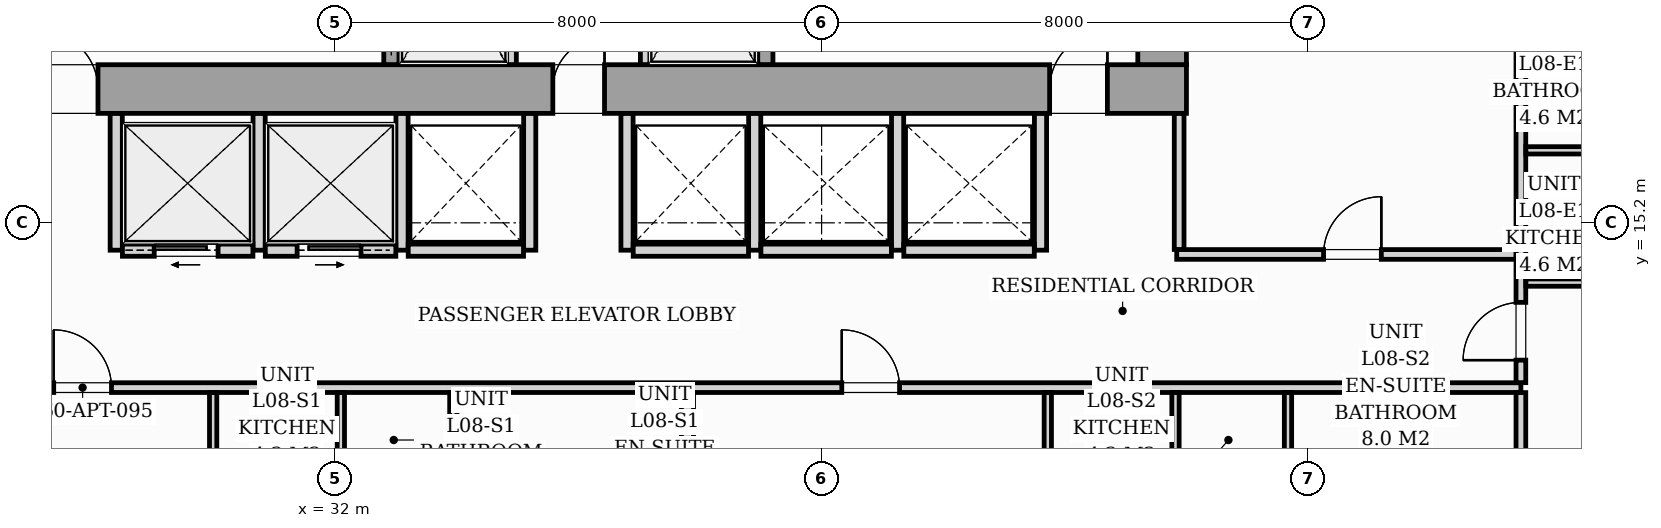
"""IFC4 building model, lengths in metres.
Left out: names, types, materials, properties, quantities, classifications, styles, units other than length and angle.
Written with IfcOpenShell. Run it as: python <this file> out.ifc"""

import sys

from ifc_helpers import new_model, si_unit, direction, frame, frame_2d, origin, origin_2d, place, context, subcontext, project, spatial, rectangle, i_section, extrude, source, transform, mapped, element, fill, save


model = new_model("IFC4")
c1 = context("Model", 3, precision=1e-05, world=origin(), true_north=direction((0.0, 1.0)))
c2 = subcontext(c1, "Body", "Model", "MODEL_VIEW")
j1 = project(units=[si_unit("LENGTHUNIT", "METRE"), si_unit("PLANEANGLEUNIT", "RADIAN")], contexts=[c1])
p1 = place(None, origin())
s1 = spatial("IfcSite", under=j1, at=p1, CompositionType="ELEMENT")
p2 = place(p1, origin())
s2 = spatial("IfcBuilding", under=s1, at=p2, CompositionType="ELEMENT")
p3 = place(p2, frame((0.0, 0.0, 32.6)))
s3 = spatial("IfcBuildingStorey", under=s2, at=p3, CompositionType="ELEMENT", Elevation=32.6)
m1 = source(origin(), c2, "Body", "SweptSolid", [
    extrude(i_section(OverallWidth=0.437, OverallDepth=0.514, WebThickness=0.061, FlangeThickness=0.097, FilletRadius=0.018, at=origin_2d()), origin(), (0.0, 0.0, 1.0), 3.196),
])
for number, where, z_axis, x_axis in (
    (1, (33.12, 17.4, 0.002), (0.0, 0.0, 1.0), (1.0, 0.0, 0.0)),
    (2, (38.88, 17.4, 0.002), (0.0, 0.0, 1.0), (1.0, 0.0, 0.0)),
    (3, (45.6, 17.4, 0.002), (0.0, 0.0, 1.0), (1.0, 0.0, 0.0)),
):
    element("IfcColumn", number, at=place(p3, frame(where, z_axis=z_axis, x_axis=x_axis)), inside=s3, PredefinedType="PILASTER", context=c2, shape_type="MappedRepresentation", body=[
        mapped(m1, transform((0.0, 0.0, 0.0), scale=1.0)),
    ])
p4 = place(p3, frame((26.0, 17.4, 0.0), z_axis=(0.0, 0.0, 1.0), x_axis=(1.0, 0.0, 0.0)))
e4 = element("IfcWall", 4, at=p4, inside=s3, PredefinedType="SHEAR", context=c2, shape_type="SweptSolid", body=[
    extrude(rectangle(XDim=20.0, YDim=0.8, at=frame_2d((10.0, 0.0))), origin(), (0.0, 0.0, 1.0), 3.2),
])
p5 = place(p4, frame((1.15, 0.0, 0.0)))
e5 = element("IfcOpeningElement", 5, at=p5, cuts=e4, PredefinedType="OPENING", context=c2, shape_type="SweptSolid", body=[
    extrude(rectangle(XDim=0.95, YDim=2.06, at=frame_2d((0.475, 1.03))), frame((0.0, 0.41, 0.0), z_axis=(0.0, -1.0, 0.0), x_axis=(1.0, 0.0, 0.0)), (0.0, 0.0, 1.0), 0.82),
])
p6 = place(p4, frame((9.58, 0.0, 0.0)))
e6 = element("IfcOpeningElement", 6, at=p6, cuts=e4, PredefinedType="OPENING", context=c2, shape_type="SweptSolid", body=[
    extrude(rectangle(XDim=0.85, YDim=2.0, at=frame_2d((0.425, 1.0))), frame((0.0, 0.41, 0.0), z_axis=(0.0, -1.0, 0.0), x_axis=(1.0, 0.0, 0.0)), (0.0, 0.0, 1.0), 0.82),
])
p7 = place(p4, frame((17.75, 0.0, 0.0)))
e7 = element("IfcOpeningElement", 7, at=p7, cuts=e4, PredefinedType="OPENING", context=c2, shape_type="SweptSolid", body=[
    extrude(rectangle(XDim=0.95, YDim=2.06, at=frame_2d((0.475, 1.03))), frame((0.0, 0.41, 0.0), z_axis=(0.0, -1.0, 0.0), x_axis=(1.0, 0.0, 0.0)), (0.0, 0.0, 1.0), 0.82),
])
p8 = place(p3, frame((45.6, 17.802, 0.0), z_axis=(0.0, 0.0, 1.0), x_axis=(0.0, 1.0, 0.0)))
e8 = element("IfcWall", 8, at=p8, inside=s3, PredefinedType="SHEAR", context=c2, shape_type="SweptSolid", body=[
    extrude(rectangle(XDim=5.796, YDim=0.8, at=frame_2d((2.898, 0.0))), origin(), (0.0, 0.0, 1.0), 3.2),
])
p9 = place(p3, frame((32.925, 17.802, 0.0), z_axis=(0.0, 0.0, 1.0), x_axis=(0.0, 1.0, 0.0)))
e9 = element("IfcWall", 9, at=p9, inside=s3, PredefinedType="SOLIDWALL", context=c2, shape_type="SweptSolid", body=[
    extrude(rectangle(XDim=2.646, YDim=0.25, at=frame_2d((1.323, 0.0))), origin(), (0.0, 0.0, 1.0), 3.2),
])
p10 = place(p9, frame((0.648, 0.0, 0.0)))
e10 = element("IfcOpeningElement", 10, at=p10, cuts=e9, PredefinedType="OPENING", context=c2, shape_type="SweptSolid", body=[
    extrude(rectangle(XDim=1.1, YDim=2.08, at=frame_2d((0.55, 1.04))), frame((0.0, 0.135, 0.0), z_axis=(0.0, -1.0, 0.0), x_axis=(1.0, 0.0, 0.0)), (0.0, 0.0, 1.0), 0.27),
])
for number, where, z_axis, x_axis in (
    (11, (34.9, 17.802, 0.0), (0.0, 0.0, 1.0), (0.0, 1.0, 0.0)),
    (12, (37.1, 17.802, 0.0), (0.0, 0.0, 1.0), (0.0, 1.0, 0.0)),
):
    element("IfcWall", number, at=place(p3, frame(where, z_axis=z_axis, x_axis=x_axis)), inside=s3, PredefinedType="PARTITIONING", context=c2, shape_type="SweptSolid", body=[
        extrude(rectangle(XDim=2.646, YDim=0.16, at=frame_2d((1.323, 0.0))), origin(), (0.0, 0.0, 1.0), 2.94),
    ])
p11 = place(p3, frame((39.075, 17.802, 0.0), z_axis=(0.0, 0.0, 1.0), x_axis=(0.0, 1.0, 0.0)))
e13 = element("IfcWall", 13, at=p11, inside=s3, PredefinedType="SOLIDWALL", context=c2, shape_type="SweptSolid", body=[
    extrude(rectangle(XDim=2.646, YDim=0.25, at=frame_2d((1.323, 0.0))), origin(), (0.0, 0.0, 1.0), 3.2),
])
p12 = place(p11, frame((0.648, 0.0, 0.0)))
e14 = element("IfcOpeningElement", 14, at=p12, cuts=e13, PredefinedType="OPENING", context=c2, shape_type="SweptSolid", body=[
    extrude(rectangle(XDim=1.1, YDim=2.08, at=frame_2d((0.55, 1.04))), frame((0.0, 0.135, 0.0), z_axis=(0.0, -1.0, 0.0), x_axis=(1.0, 0.0, 0.0)), (0.0, 0.0, 1.0), 0.27),
])
for number, where, z_axis, x_axis in (
    (15, (28.4, 14.75, 0.0), (0.0, 0.0, 1.0), (0.0, 1.0, 0.0)),
    (16, (30.75, 14.75, 0.0), (0.0, 0.0, 1.0), (0.0, 1.0, 0.0)),
    (17, (33.1, 14.75, 0.0), (0.0, 0.0, 1.0), (0.0, 1.0, 0.0)),
):
    element("IfcWall", number, at=place(p3, frame(where, z_axis=z_axis, x_axis=x_axis)), inside=s3, PredefinedType="PARTITIONING", context=c2, shape_type="SweptSolid", body=[
        extrude(rectangle(XDim=2.248, YDim=0.2, at=frame_2d((1.124, 0.0))), origin(), (0.0, 0.0, 1.0), 2.94),
    ])
p13 = place(p3, frame((28.502, 14.75, 0.0), z_axis=(0.0, 0.0, 1.0), x_axis=(1.0, 0.0, 0.0)))
e18 = element("IfcWall", 18, at=p13, inside=s3, PredefinedType="PARTITIONING", context=c2, shape_type="SweptSolid", body=[
    extrude(rectangle(XDim=2.146, YDim=0.2, at=frame_2d((1.073, 0.0))), origin(), (0.0, 0.0, 1.0), 2.94),
])
p14 = place(p13, frame((0.523, 0.0, 0.0)))
e19 = element("IfcOpeningElement", 19, at=p14, cuts=e18, PredefinedType="OPENING", context=c2, shape_type="SweptSolid", body=[
    extrude(rectangle(XDim=1.05, YDim=2.08, at=frame_2d((0.525, 1.04))), frame((0.0, 0.11, 0.0), z_axis=(0.0, -1.0, 0.0), x_axis=(1.0, 0.0, 0.0)), (0.0, 0.0, 1.0), 0.22),
])
p15 = place(p3, frame((30.852, 14.75, 0.0), z_axis=(0.0, 0.0, 1.0), x_axis=(1.0, 0.0, 0.0)))
e20 = element("IfcWall", 20, at=p15, inside=s3, PredefinedType="PARTITIONING", context=c2, shape_type="SweptSolid", body=[
    extrude(rectangle(XDim=2.146, YDim=0.2, at=frame_2d((1.073, 0.0))), origin(), (0.0, 0.0, 1.0), 2.94),
])
p16 = place(p15, frame((0.523, 0.0, 0.0)))
e21 = element("IfcOpeningElement", 21, at=p16, cuts=e20, PredefinedType="OPENING", context=c2, shape_type="SweptSolid", body=[
    extrude(rectangle(XDim=1.05, YDim=2.08, at=frame_2d((0.525, 1.04))), frame((0.0, 0.11, 0.0), z_axis=(0.0, -1.0, 0.0), x_axis=(1.0, 0.0, 0.0)), (0.0, 0.0, 1.0), 0.22),
])
p17 = place(p3, frame((35.2, 14.75, 0.0), z_axis=(0.0, 0.0, 1.0), x_axis=(0.0, 1.0, 0.0)))
e22 = element("IfcWall", 22, at=p17, inside=s3, PredefinedType="PARTITIONING", context=c2, shape_type="SweptSolid", body=[
    extrude(rectangle(XDim=2.248, YDim=0.2, at=frame_2d((1.124, 0.0))), origin(), (0.0, 0.0, 1.0), 2.94),
])
p18 = place(p3, frame((33.202, 14.75, 0.0), z_axis=(0.0, 0.0, 1.0), x_axis=(1.0, 0.0, 0.0)))
e23 = element("IfcWall", 23, at=p18, inside=s3, PredefinedType="PARTITIONING", context=c2, shape_type="SweptSolid", body=[
    extrude(rectangle(XDim=1.896, YDim=0.2, at=frame_2d((0.948, 0.0))), origin(), (0.0, 0.0, 1.0), 2.94),
])
for number, where, z_axis, x_axis in (
    (24, (36.8, 14.75, 0.0), (0.0, 0.0, 1.0), (0.0, 1.0, 0.0)),
    (25, (38.9, 14.75, 0.0), (0.0, 0.0, 1.0), (0.0, 1.0, 0.0)),
):
    element("IfcWall", number, at=place(p3, frame(where, z_axis=z_axis, x_axis=x_axis)), inside=s3, PredefinedType="PARTITIONING", context=c2, shape_type="SweptSolid", body=[
        extrude(rectangle(XDim=2.248, YDim=0.2, at=frame_2d((1.124, 0.0))), origin(), (0.0, 0.0, 1.0), 2.94),
    ])
p19 = place(p3, frame((36.902, 14.75, 0.0), z_axis=(0.0, 0.0, 1.0), x_axis=(1.0, 0.0, 0.0)))
e26 = element("IfcWall", 26, at=p19, inside=s3, PredefinedType="PARTITIONING", context=c2, shape_type="SweptSolid", body=[
    extrude(rectangle(XDim=1.896, YDim=0.2, at=frame_2d((0.948, 0.0))), origin(), (0.0, 0.0, 1.0), 2.94),
])
for number, where, z_axis, x_axis in (
    (27, (41.25, 14.75, 0.0), (0.0, 0.0, 1.0), (0.0, 1.0, 0.0)),
    (28, (43.6, 14.75, 0.0), (0.0, 0.0, 1.0), (0.0, 1.0, 0.0)),
):
    element("IfcWall", number, at=place(p3, frame(where, z_axis=z_axis, x_axis=x_axis)), inside=s3, PredefinedType="PARTITIONING", context=c2, shape_type="SweptSolid", body=[
        extrude(rectangle(XDim=2.248, YDim=0.2, at=frame_2d((1.124, 0.0))), origin(), (0.0, 0.0, 1.0), 2.94),
    ])
for number, where, z_axis, x_axis in (
    (29, (39.002, 14.75, 0.0), (0.0, 0.0, 1.0), (1.0, 0.0, 0.0)),
    (30, (41.352, 14.75, 0.0), (0.0, 0.0, 1.0), (1.0, 0.0, 0.0)),
):
    element("IfcWall", number, at=place(p3, frame(where, z_axis=z_axis, x_axis=x_axis)), inside=s3, PredefinedType="PARTITIONING", context=c2, shape_type="SweptSolid", body=[
        extrude(rectangle(XDim=2.146, YDim=0.2, at=frame_2d((1.073, 0.0))), origin(), (0.0, 0.0, 1.0), 2.94),
    ])
p20 = place(p3, frame((16.3, 12.49, 0.0), z_axis=(0.0, 0.0, 1.0), x_axis=(1.0, 0.0, 0.0)))
e31 = element("IfcWall", 31, at=p20, inside=s3, PredefinedType="PARTITIONING", context=c2, shape_type="SweptSolid", body=[
    extrude(rectangle(XDim=35.2, YDim=0.16, at=frame_2d((17.6, 0.0))), origin(), (0.0, 0.0, 1.0), 2.94),
])
p21 = place(p20, frame((11.072, 0.0, 0.0)))
e32 = element("IfcOpeningElement", 32, at=p21, cuts=e31, PredefinedType="OPENING", context=c2, shape_type="SweptSolid", body=[
    extrude(rectangle(XDim=0.95, YDim=2.06, at=frame_2d((0.475, 1.03))), frame((0.0, 0.09, 0.0), z_axis=(0.0, -1.0, 0.0), x_axis=(1.0, 0.0, 0.0)), (0.0, 0.0, 1.0), 0.18),
])
p22 = place(p20, frame((24.032, 0.0, 0.0)))
e33 = element("IfcOpeningElement", 33, at=p22, cuts=e31, PredefinedType="OPENING", context=c2, shape_type="SweptSolid", body=[
    extrude(rectangle(XDim=0.95, YDim=2.06, at=frame_2d((0.475, 1.03))), frame((0.0, 0.09, 0.0), z_axis=(0.0, -1.0, 0.0), x_axis=(1.0, 0.0, 0.0)), (0.0, 0.0, 1.0), 0.18),
])
p23 = place(p3, frame((51.5, 2.962, 0.0), z_axis=(0.0, 0.0, 1.0), x_axis=(0.0, 1.0, 0.0)))
e34 = element("IfcWall", 34, at=p23, inside=s3, PredefinedType="PARTITIONING", context=c2, shape_type="SweptSolid", body=[
    extrude(rectangle(XDim=9.446, YDim=0.16, at=frame_2d((4.723, 0.0))), origin(), (0.0, 0.0, 1.0), 2.94),
])
p24 = place(p3, frame((51.5, 12.572, 0.0), z_axis=(0.0, 0.0, 1.0), x_axis=(0.0, 1.0, 0.0)))
e35 = element("IfcWall", 35, at=p24, inside=s3, PredefinedType="PARTITIONING", context=c2, shape_type="SweptSolid", body=[
    extrude(rectangle(XDim=14.866, YDim=0.16, at=frame_2d((7.433, 0.0))), origin(), (0.0, 0.0, 1.0), 2.94),
])
p25 = place(p24, frame((0.37, 0.0, 0.0)))
e36 = element("IfcOpeningElement", 36, at=p25, cuts=e35, PredefinedType="OPENING", context=c2, shape_type="SweptSolid", body=[
    extrude(rectangle(XDim=0.95, YDim=2.06, at=frame_2d((0.475, 1.03))), frame((0.0, 0.09, 0.0), z_axis=(0.0, -1.0, 0.0), x_axis=(1.0, 0.0, 0.0)), (0.0, 0.0, 1.0), 0.18),
])
p26 = place(p3, frame((33.944, 2.78, 0.0), z_axis=(0.0, 0.0, 1.0), x_axis=(0.0, 1.0, 0.0)))
e37 = element("IfcWall", 37, at=p26, inside=s3, PredefinedType="PARTITIONING", context=c2, shape_type="SweptSolid", body=[
    extrude(rectangle(XDim=9.628, YDim=0.12, at=frame_2d((4.814, 0.0))), origin(), (0.0, 0.0, 1.0), 2.94),
])
p27 = place(p26, frame((6.36, 0.0, 0.0)))
e38 = element("IfcOpeningElement", 38, at=p27, cuts=e37, PredefinedType="OPENING", context=c2, shape_type="SweptSolid", body=[
    extrude(rectangle(XDim=0.9, YDim=2.05, at=frame_2d((0.45, 1.025))), frame((0.0, 0.07, 0.0), z_axis=(0.0, -1.0, 0.0), x_axis=(1.0, 0.0, 0.0)), (0.0, 0.0, 1.0), 0.14),
])
for number, where, z_axis, x_axis in (
    (39, (32.094, 10.302, 0.0), (0.0, 0.0, 1.0), (0.0, 1.0, 0.0)),
    (40, (29.994, 10.302, 0.0), (0.0, 0.0, 1.0), (0.0, 1.0, 0.0)),
):
    element("IfcWall", number, at=place(p3, frame(where, z_axis=z_axis, x_axis=x_axis)), inside=s3, PredefinedType="PARTITIONING", context=c2, shape_type="SweptSolid", body=[
        extrude(rectangle(XDim=2.106, YDim=0.12, at=frame_2d((1.053, 0.0))), origin(), (0.0, 0.0, 1.0), 2.94),
    ])
p28 = place(p3, frame((37.794, 10.252, 0.0), z_axis=(0.0, 0.0, 1.0), x_axis=(0.0, 1.0, 0.0)))
e41 = element("IfcWall", 41, at=p28, inside=s3, PredefinedType="PARTITIONING", context=c2, shape_type="SweptSolid", body=[
    extrude(rectangle(XDim=2.156, YDim=0.2, at=frame_2d((1.078, 0.0))), origin(), (0.0, 0.0, 1.0), 2.94),
])
p29 = place(p3, frame((47.67, 2.962, 0.0), z_axis=(0.0, 0.0, 1.0), x_axis=(0.0, 1.0, 0.0)))
e42 = element("IfcWall", 42, at=p29, inside=s3, PredefinedType="PARTITIONING", context=c2, shape_type="SweptSolid", body=[
    extrude(rectangle(XDim=9.446, YDim=0.12, at=frame_2d((4.723, 0.0))), origin(), (0.0, 0.0, 1.0), 2.94),
])
p30 = place(p29, frame((6.178, 0.0, 0.0)))
e43 = element("IfcOpeningElement", 43, at=p30, cuts=e42, PredefinedType="OPENING", context=c2, shape_type="SweptSolid", body=[
    extrude(rectangle(XDim=0.9, YDim=2.05, at=frame_2d((0.45, 1.025))), frame((0.0, 0.07, 0.0), z_axis=(0.0, -1.0, 0.0), x_axis=(1.0, 0.0, 0.0)), (0.0, 0.0, 1.0), 0.14),
])
for number, where, z_axis, x_axis in (
    (44, (45.82, 10.302, 0.0), (0.0, 0.0, 1.0), (0.0, 1.0, 0.0)),
    (45, (43.72, 10.302, 0.0), (0.0, 0.0, 1.0), (0.0, 1.0, 0.0)),
):
    element("IfcWall", number, at=place(p3, frame(where, z_axis=z_axis, x_axis=x_axis)), inside=s3, PredefinedType="PARTITIONING", context=c2, shape_type="SweptSolid", body=[
        extrude(rectangle(XDim=2.106, YDim=0.12, at=frame_2d((1.053, 0.0))), origin(), (0.0, 0.0, 1.0), 2.94),
    ])
p31 = place(p3, frame((51.582, 16.392, 0.0), z_axis=(0.0, 0.0, 1.0), x_axis=(1.0, 0.0, 0.0)))
e46 = element("IfcWall", 46, at=p31, inside=s3, PredefinedType="PARTITIONING", context=c2, shape_type="SweptSolid", body=[
    extrude(rectangle(XDim=2.256, YDim=0.12, at=frame_2d((1.128, 0.0))), origin(), (0.0, 0.0, 1.0), 2.045),
])
p32 = place(p3, frame((51.582, 14.217, 0.0), z_axis=(0.0, 0.0, 1.0), x_axis=(1.0, 0.0, 0.0)))
e47 = element("IfcWall", 47, at=p32, inside=s3, PredefinedType="PARTITIONING", context=c2, shape_type="SweptSolid", body=[
    extrude(rectangle(XDim=2.256, YDim=0.12, at=frame_2d((1.128, 0.0))), origin(), (0.0, 0.0, 1.0), 2.94),
])
p33 = place(p3, frame((45.84, 14.68, 0.0), z_axis=(0.0, 0.0, 1.0), x_axis=(1.0, 0.0, 0.0)))
e48 = element("IfcWall", 48, at=p33, inside=s3, PredefinedType="PARTITIONING", context=c2, shape_type="SweptSolid", body=[
    extrude(rectangle(XDim=5.578, YDim=0.16, at=frame_2d((2.789, 0.0))), origin(), (0.0, 0.0, 1.0), 2.94),
])
p34 = place(p33, frame((2.415, 0.0, 0.0)))
e49 = element("IfcOpeningElement", 49, at=p34, cuts=e48, PredefinedType="OPENING", context=c2, shape_type="SweptSolid", body=[
    extrude(rectangle(XDim=0.95, YDim=2.06, at=frame_2d((0.475, 1.03))), frame((0.0, 0.09, 0.0), z_axis=(0.0, -1.0, 0.0), x_axis=(1.0, 0.0, 0.0)), (0.0, 0.0, 1.0), 0.18),
])
p35 = place(p3, frame((45.88, 14.762, 0.0), z_axis=(0.0, 0.0, 1.0), x_axis=(0.0, 1.0, 0.0)))
e50 = element("IfcWall", 50, at=p35, inside=s3, PredefinedType="PARTITIONING", context=c2, shape_type="SweptSolid", body=[
    extrude(rectangle(XDim=2.236, YDim=0.16, at=frame_2d((1.118, 0.0))), origin(), (0.0, 0.0, 1.0), 2.94),
])
m2 = source(origin(), c2, "Body", "SweptSolid", [
    extrude(rectangle(XDim=0.95, YDim=2.06, at=frame_2d((0.475, 1.03))), frame((0.0, 0.025, 0.0), z_axis=(0.0, -1.0, 0.0), x_axis=(1.0, 0.0, 0.0)), (0.0, 0.0, 1.0), 0.05),
])
p36 = place(p5, origin())
e51 = element("IfcDoor", 51, at=p36, inside=s3, OperationType="SINGLE_SWING_LEFT", PredefinedType="DOOR", context=c2, shape_type="MappedRepresentation", body=[
    mapped(m2, transform((0.0, 0.0, 0.0), scale=1.0)),
])
fill(e5, e51)
m3 = source(origin(), c2, "Body", "SweptSolid", [
    extrude(rectangle(XDim=0.85, YDim=2.0, at=frame_2d((0.425, 1.0))), frame((0.0, 0.025, 0.0), z_axis=(0.0, -1.0, 0.0), x_axis=(1.0, 0.0, 0.0)), (0.0, 0.0, 1.0), 0.05),
])
p37 = place(p6, origin())
e52 = element("IfcDoor", 52, at=p37, inside=s3, OperationType="SINGLE_SWING_RIGHT", PredefinedType="DOOR", context=c2, shape_type="MappedRepresentation", body=[
    mapped(m3, transform((0.0, 0.0, 0.0), scale=1.0)),
])
fill(e6, e52)
p38 = place(p7, origin())
e53 = element("IfcDoor", 53, at=p38, inside=s3, OperationType="SINGLE_SWING_RIGHT", PredefinedType="DOOR", context=c2, shape_type="MappedRepresentation", body=[
    mapped(m2, transform((0.0, 0.0, 0.0), scale=1.0)),
])
fill(e7, e53)
m4 = source(origin(), c2, "Body", "SweptSolid", [
    extrude(rectangle(XDim=1.05, YDim=2.08, at=frame_2d((0.525, 1.04))), frame((0.0, 0.025, 0.0), z_axis=(0.0, -1.0, 0.0), x_axis=(1.0, 0.0, 0.0)), (0.0, 0.0, 1.0), 0.05),
])
p39 = place(p14, origin())
e54 = element("IfcDoor", 54, at=p39, inside=s3, OperationType="SLIDING_TO_LEFT", PredefinedType="DOOR", context=c2, shape_type="MappedRepresentation", body=[
    mapped(m4, transform((0.0, 0.0, 0.0), scale=1.0)),
])
fill(e19, e54)
p40 = place(p16, origin())
e55 = element("IfcDoor", 55, at=p40, inside=s3, OperationType="SLIDING_TO_RIGHT", PredefinedType="DOOR", context=c2, shape_type="MappedRepresentation", body=[
    mapped(m4, transform((0.0, 0.0, 0.0), scale=1.0)),
])
fill(e21, e55)
m5 = source(origin(), c2, "Body", "SweptSolid", [
    extrude(rectangle(XDim=0.95, YDim=2.06, at=frame_2d((0.475, 1.03))), frame((0.0, 0.025, 0.0), z_axis=(0.0, -1.0, 0.0), x_axis=(1.0, 0.0, 0.0)), (0.0, 0.0, 1.0), 0.05),
])
p41 = place(p21, origin())
e56 = element("IfcDoor", 56, at=p41, inside=s3, OperationType="SINGLE_SWING_LEFT", PredefinedType="DOOR", context=c2, shape_type="MappedRepresentation", body=[
    mapped(m5, transform((0.0, 0.0, 0.0), scale=1.0)),
])
fill(e32, e56)
p42 = place(p22, origin())
e57 = element("IfcDoor", 57, at=p42, inside=s3, OperationType="SINGLE_SWING_LEFT", PredefinedType="DOOR", context=c2, shape_type="MappedRepresentation", body=[
    mapped(m5, transform((0.0, 0.0, 0.0), scale=1.0)),
])
fill(e33, e57)
p43 = place(p25, origin())
e58 = element("IfcDoor", 58, at=p43, inside=s3, OperationType="SINGLE_SWING_LEFT", PredefinedType="DOOR", context=c2, shape_type="MappedRepresentation", body=[
    mapped(m5, transform((0.0, 0.0, 0.0), scale=1.0)),
])
fill(e36, e58)
p44 = place(p34, origin())
e59 = element("IfcDoor", 59, at=p44, inside=s3, OperationType="SINGLE_SWING_RIGHT", PredefinedType="DOOR", context=c2, shape_type="MappedRepresentation", body=[
    mapped(m5, transform((0.0, 0.0, 0.0), scale=1.0)),
])
fill(e49, e59)
save(model, sys.argv[1])
